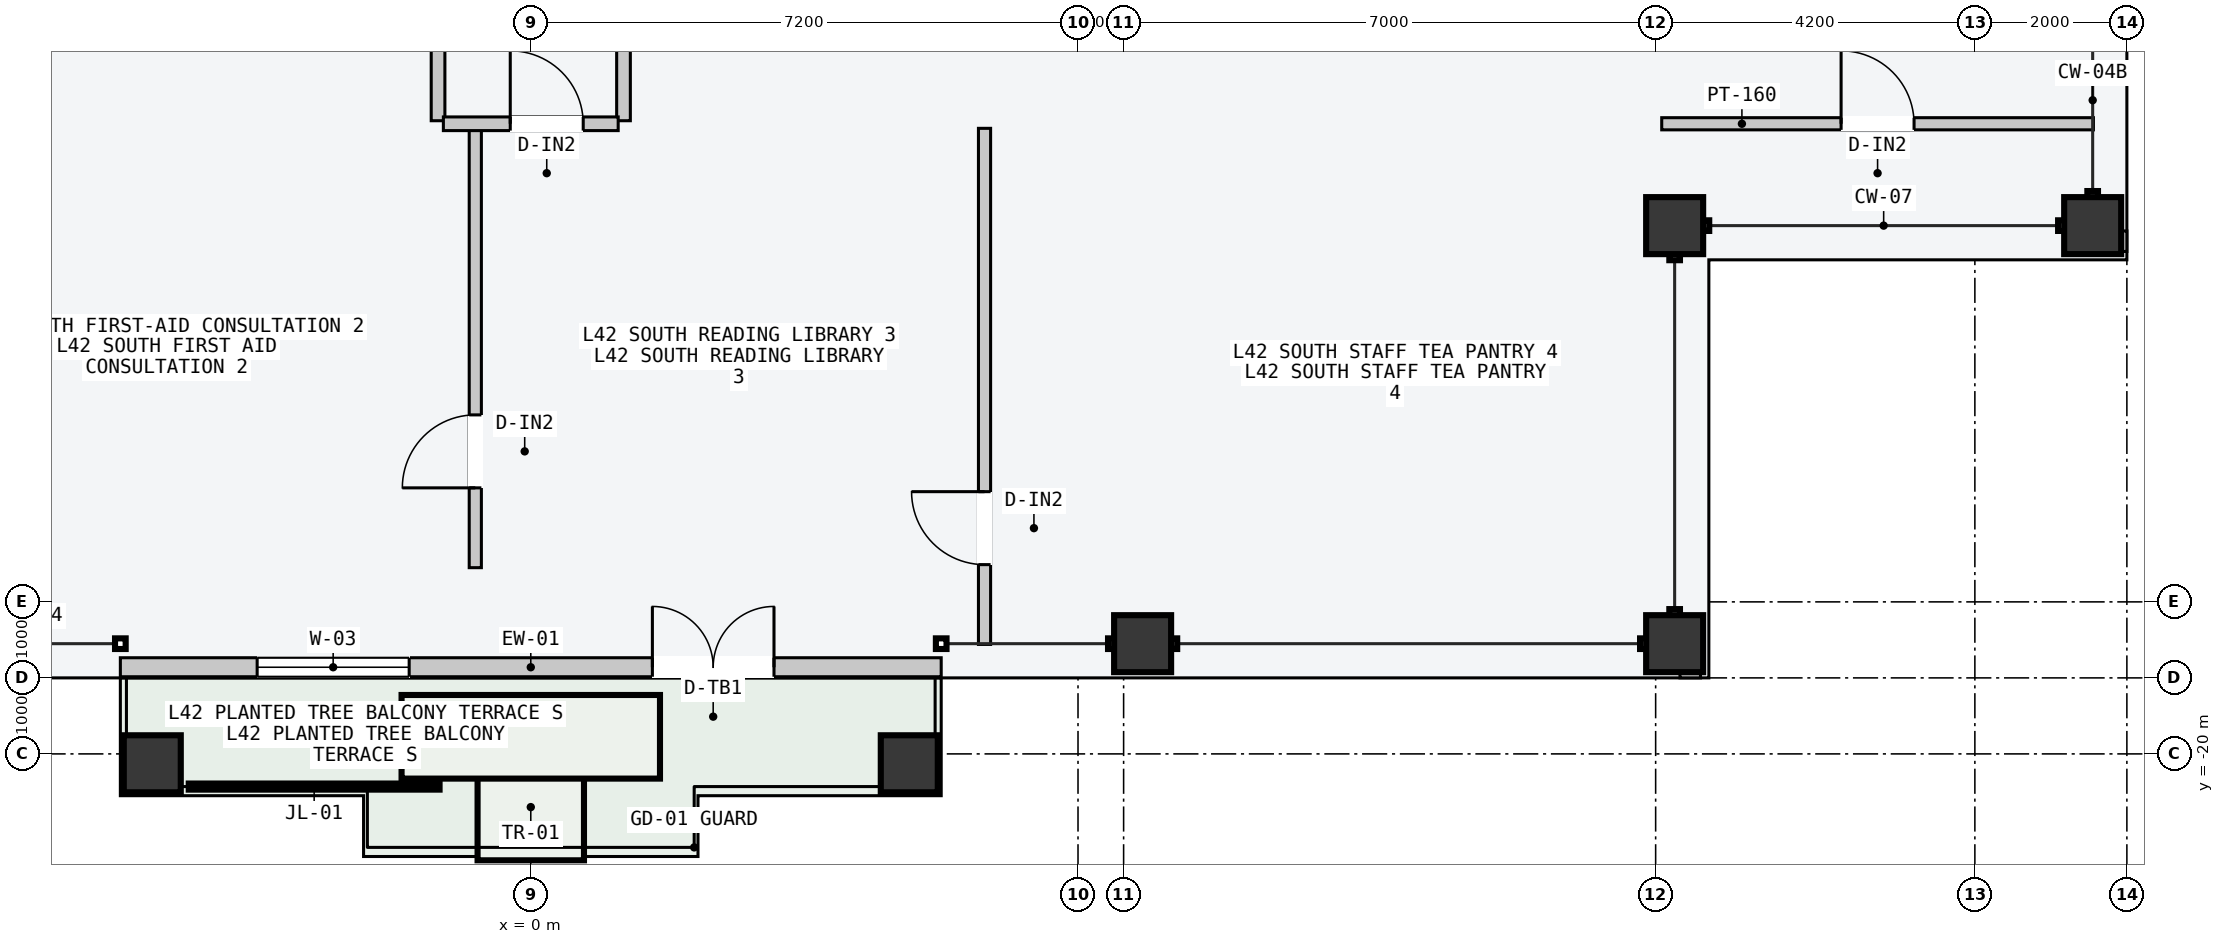
"""IFC4 building model, lengths in metres.
Left out: names, types, materials, properties, quantities, classifications, styles, units other than length and angle.
Written with IfcOpenShell. Run it as: python <this file> out.ifc"""

import sys

from ifc_helpers import new_model, si_unit, direction, frame, frame_2d, origin, origin_2d, place, context, subcontext, project, spatial, rectangle, hollow_rectangle, extrude, element, fill, save


model = new_model("IFC4")
c1 = context("Model", 3, precision=1e-05, world=origin(), true_north=direction((0.0, 1.0)))
c2 = subcontext(c1, "Body", "Model", "MODEL_VIEW")
j1 = project(units=[si_unit("LENGTHUNIT", "METRE"), si_unit("PLANEANGLEUNIT", "RADIAN")], contexts=[c1])
p1 = place(None, origin())
s1 = spatial("IfcSite", under=j1, at=p1, CompositionType="ELEMENT")
p2 = place(p1, origin())
s2 = spatial("IfcBuilding", under=s1, at=p2, CompositionType="ELEMENT")
p3 = place(p2, frame((0.0, 0.0, 162.3)))
s3 = spatial("IfcBuildingStorey", under=s2, at=p3, CompositionType="ELEMENT", Elevation=162.3)
for number, where, z_axis, x_axis in (
    (1, (8.05, -18.55, 0.0), (0.0, 0.0, 1.0), (1.0, 0.0, 0.0)),
    (2, (15.05, -18.55, 0.0), (0.0, 0.0, 1.0), (1.0, 0.0, 0.0)),
    (3, (20.55, -13.05, 0.0), (0.0, 0.0, 1.0), (0.0, 1.0, 0.0)),
    (4, (15.05, -13.05, 0.0), (0.0, 0.0, 1.0), (1.0, 0.0, 0.0)),
    (5, (-4.98, -20.13, 0.0), (0.0, 0.0, 1.0), (1.0, 0.0, 0.0)),
    (6, (4.98, -20.13, 0.0), (0.0, 0.0, 1.0), (1.0, 0.0, 0.0)),
):
    element("IfcColumn", number, at=place(p3, frame(where, z_axis=z_axis, x_axis=x_axis)), inside=s3, PredefinedType="COLUMN", context=c2, shape_type="SweptSolid", body=[
        extrude(hollow_rectangle(XDim=0.75, YDim=0.75, WallThickness=0.032, at=origin_2d()), origin(), (0.0, 0.0, 1.0), 3.6),
    ])
p4 = place(p3, frame((-5.4, -18.86, 0.0), z_axis=(0.0, 0.0, 1.0), x_axis=(1.0, 0.0, 0.0)))
e7 = element("IfcWall", 7, at=p4, inside=s3, PredefinedType="STANDARD", context=c2, shape_type="SweptSolid", body=[
    extrude(rectangle(XDim=10.8, YDim=0.25, at=frame_2d((5.4, 0.0))), origin(), (0.0, 0.0, 1.0), 3.4),
])
p5 = place(p4, frame((7.0, 0.0, 0.0)))
e8 = element("IfcOpeningElement", 8, at=p5, cuts=e7, PredefinedType="OPENING", context=c2, shape_type="SweptSolid", body=[
    extrude(rectangle(XDim=1.6, YDim=2.2, at=frame_2d((0.8, 1.1))), frame((0.0, 0.135, 0.0), z_axis=(0.0, -1.0, 0.0), x_axis=(1.0, 0.0, 0.0)), (0.0, 0.0, 1.0), 0.27),
])
p6 = place(p4, frame((1.8, 0.0, 0.85)))
e9 = element("IfcOpeningElement", 9, at=p6, cuts=e7, PredefinedType="OPENING", context=c2, shape_type="SweptSolid", body=[
    extrude(rectangle(XDim=2.0, YDim=2.1, at=frame_2d((1.0, 1.05))), frame((0.0, 0.135, 0.0), z_axis=(0.0, -1.0, 0.0), x_axis=(1.0, 0.0, 0.0)), (0.0, 0.0, 1.0), 0.27),
])
for number, where, z_axis, x_axis in (
    (10, (15.12, -18.89, 0.0), (0.0, 0.0, 1.0), (1.0, 0.0, 0.0)),
    (11, (20.89, -13.39, 0.0), (0.0, 0.0, 1.0), (0.0, 1.0, 0.0)),
):
    element("IfcWall", number, at=place(p3, frame(where, z_axis=z_axis, x_axis=x_axis)), inside=s3, PredefinedType="PARAPET", context=c2, shape_type="SweptSolid", body=[
        extrude(rectangle(XDim=0.27, YDim=0.22, at=frame_2d((0.135, 0.0))), origin(), (0.0, 0.0, 1.0), 1.2),
    ])
p7 = place(p3, frame((-1.22, -11.67, 0.0), z_axis=(0.0, 0.0, 1.0), x_axis=(0.0, 1.0, 0.0)))
e12 = element("IfcWall", 12, at=p7, inside=s3, PredefinedType="PARTITIONING", context=c2, shape_type="SweptSolid", body=[
    extrude(rectangle(XDim=5.99, YDim=0.18, at=frame_2d((2.995, 0.0))), origin(), (0.0, 0.0, 1.0), 3.4),
])
p8 = place(p7, frame((1.15, 0.0, 0.0)))
e13 = element("IfcOpeningElement", 13, at=p8, cuts=e12, PredefinedType="OPENING", context=c2, shape_type="SweptSolid", body=[
    extrude(rectangle(XDim=0.96, YDim=2.18, at=frame_2d((0.48, 1.09))), frame((0.0, 0.1, 0.0), z_axis=(0.0, -1.0, 0.0), x_axis=(1.0, 0.0, 0.0)), (0.0, 0.0, 1.0), 0.2),
])
p9 = place(p3, frame((1.22, -11.67, 0.0), z_axis=(0.0, 0.0, 1.0), x_axis=(0.0, 1.0, 0.0)))
e14 = element("IfcWall", 14, at=p9, inside=s3, PredefinedType="PARTITIONING", context=c2, shape_type="SweptSolid", body=[
    extrude(rectangle(XDim=5.99, YDim=0.18, at=frame_2d((2.995, 0.0))), origin(), (0.0, 0.0, 1.0), 3.4),
])
p10 = place(p9, frame((1.15, 0.0, 0.0)))
e15 = element("IfcOpeningElement", 15, at=p10, cuts=e14, PredefinedType="OPENING", context=c2, shape_type="SweptSolid", body=[
    extrude(rectangle(XDim=0.96, YDim=2.18, at=frame_2d((0.48, 1.09))), frame((0.0, 0.1, 0.0), z_axis=(0.0, -1.0, 0.0), x_axis=(1.0, 0.0, 0.0)), (0.0, 0.0, 1.0), 0.2),
])
p11 = place(p3, frame((-0.73, -17.55, 0.0), z_axis=(0.0, 0.0, 1.0), x_axis=(0.0, 1.0, 0.0)))
e16 = element("IfcWall", 16, at=p11, inside=s3, PredefinedType="PARTITIONING", context=c2, shape_type="SweptSolid", body=[
    extrude(rectangle(XDim=5.78, YDim=0.16, at=frame_2d((2.89, 0.0))), origin(), (0.0, 0.0, 1.0), 3.4),
])
p12 = place(p11, frame((1.05, 0.0, 0.0)))
e17 = element("IfcOpeningElement", 17, at=p12, cuts=e16, PredefinedType="OPENING", context=c2, shape_type="SweptSolid", body=[
    extrude(rectangle(XDim=0.96, YDim=2.18, at=frame_2d((0.48, 1.09))), frame((0.0, 0.09, 0.0), z_axis=(0.0, -1.0, 0.0), x_axis=(1.0, 0.0, 0.0)), (0.0, 0.0, 1.0), 0.18),
])
p13 = place(p3, frame((5.97, -18.56, 0.0), z_axis=(0.0, 0.0, 1.0), x_axis=(0.0, 1.0, 0.0)))
e18 = element("IfcWall", 18, at=p13, inside=s3, PredefinedType="PARTITIONING", context=c2, shape_type="SweptSolid", body=[
    extrude(rectangle(XDim=6.79, YDim=0.16, at=frame_2d((3.395, 0.0))), origin(), (0.0, 0.0, 1.0), 3.4),
])
p14 = place(p13, frame((1.05, 0.0, 0.0)))
e19 = element("IfcOpeningElement", 19, at=p14, cuts=e18, PredefinedType="OPENING", context=c2, shape_type="SweptSolid", body=[
    extrude(rectangle(XDim=0.96, YDim=2.18, at=frame_2d((0.48, 1.09))), frame((0.0, 0.09, 0.0), z_axis=(0.0, -1.0, 0.0), x_axis=(1.0, 0.0, 0.0)), (0.0, 0.0, 1.0), 0.18),
])
p15 = place(p3, frame((-1.15, -11.71, 0.0), z_axis=(0.0, 0.0, 1.0), x_axis=(1.0, 0.0, 0.0)))
e20 = element("IfcWall", 20, at=p15, inside=s3, PredefinedType="PARTITIONING", context=c2, shape_type="SweptSolid", body=[
    extrude(rectangle(XDim=2.3, YDim=0.18, at=frame_2d((1.15, 0.0))), origin(), (0.0, 0.0, 1.0), 3.4),
])
p16 = place(p15, frame((0.88, 0.0, 0.0)))
e21 = element("IfcOpeningElement", 21, at=p16, cuts=e20, PredefinedType="OPENING", context=c2, shape_type="SweptSolid", body=[
    extrude(rectangle(XDim=0.96, YDim=2.18, at=frame_2d((0.48, 1.09))), frame((0.0, 0.1, 0.0), z_axis=(0.0, -1.0, 0.0), x_axis=(1.0, 0.0, 0.0)), (0.0, 0.0, 1.0), 0.2),
])
p17 = place(p3, frame((14.88, -11.71, 0.0), z_axis=(0.0, 0.0, 1.0), x_axis=(1.0, 0.0, 0.0)))
e22 = element("IfcWall", 22, at=p17, inside=s3, PredefinedType="PARTITIONING", context=c2, shape_type="SweptSolid", body=[
    extrude(rectangle(XDim=5.68, YDim=0.16, at=frame_2d((2.84, 0.0))), origin(), (0.0, 0.0, 1.0), 3.4),
])
p18 = place(p17, frame((2.36, 0.0, 0.0)))
e23 = element("IfcOpeningElement", 23, at=p18, cuts=e22, PredefinedType="OPENING", context=c2, shape_type="SweptSolid", body=[
    extrude(rectangle(XDim=0.96, YDim=2.18, at=frame_2d((0.48, 1.09))), frame((0.0, 0.09, 0.0), z_axis=(0.0, -1.0, 0.0), x_axis=(1.0, 0.0, 0.0)), (0.0, 0.0, 1.0), 0.18),
])
p19 = place(p5, origin())
e24 = element("IfcDoor", 24, at=p19, inside=s3, OperationType="DOUBLE_DOOR_SINGLE_SWING", PredefinedType="DOOR", context=c2, shape_type="SweptSolid", body=[
    extrude(rectangle(XDim=1.6, YDim=2.2, at=frame_2d((0.8, 1.1))), frame((0.0, 0.025, 0.0), z_axis=(0.0, -1.0, 0.0), x_axis=(1.0, 0.0, 0.0)), (0.0, 0.0, 1.0), 0.05),
])
fill(e8, e24)
p20 = place(p6, origin())
e25 = element("IfcWindow", 25, at=p20, inside=s3, PartitioningType="SINGLE_PANEL", PredefinedType="WINDOW", context=c2, shape_type="SweptSolid", body=[
    extrude(rectangle(XDim=2.0, YDim=2.1, at=frame_2d((1.0, 1.05))), frame((0.0, 0.03, 0.0), z_axis=(0.0, -1.0, 0.0), x_axis=(1.0, 0.0, 0.0)), (0.0, 0.0, 1.0), 0.06),
])
fill(e9, e25)
p21 = place(p12, origin())
e26 = element("IfcDoor", 26, at=p21, inside=s3, OperationType="SINGLE_SWING_LEFT", PredefinedType="DOOR", context=c2, shape_type="SweptSolid", body=[
    extrude(rectangle(XDim=0.96, YDim=2.18, at=frame_2d((0.48, 1.09))), frame((0.0, 0.025, 0.0), z_axis=(0.0, -1.0, 0.0), x_axis=(1.0, 0.0, 0.0)), (0.0, 0.0, 1.0), 0.05),
])
fill(e17, e26)
p22 = place(p14, origin())
e27 = element("IfcDoor", 27, at=p22, inside=s3, OperationType="SINGLE_SWING_RIGHT", PredefinedType="DOOR", context=c2, shape_type="SweptSolid", body=[
    extrude(rectangle(XDim=0.96, YDim=2.18, at=frame_2d((0.48, 1.09))), frame((0.0, 0.025, 0.0), z_axis=(0.0, -1.0, 0.0), x_axis=(1.0, 0.0, 0.0)), (0.0, 0.0, 1.0), 0.05),
])
fill(e19, e27)
p23 = place(p16, origin())
e28 = element("IfcDoor", 28, at=p23, inside=s3, OperationType="SINGLE_SWING_LEFT", PredefinedType="DOOR", context=c2, shape_type="SweptSolid", body=[
    extrude(rectangle(XDim=0.96, YDim=2.18, at=frame_2d((0.48, 1.09))), frame((0.0, 0.025, 0.0), z_axis=(0.0, -1.0, 0.0), x_axis=(1.0, 0.0, 0.0)), (0.0, 0.0, 1.0), 0.05),
])
fill(e21, e28)
p24 = place(p18, origin())
e29 = element("IfcDoor", 29, at=p24, inside=s3, OperationType="SINGLE_SWING_LEFT", PredefinedType="DOOR", context=c2, shape_type="SweptSolid", body=[
    extrude(rectangle(XDim=0.96, YDim=2.18, at=frame_2d((0.48, 1.09))), frame((0.0, 0.025, 0.0), z_axis=(0.0, -1.0, 0.0), x_axis=(1.0, 0.0, 0.0)), (0.0, 0.0, 1.0), 0.05),
])
fill(e23, e29)
save(model, sys.argv[1])
